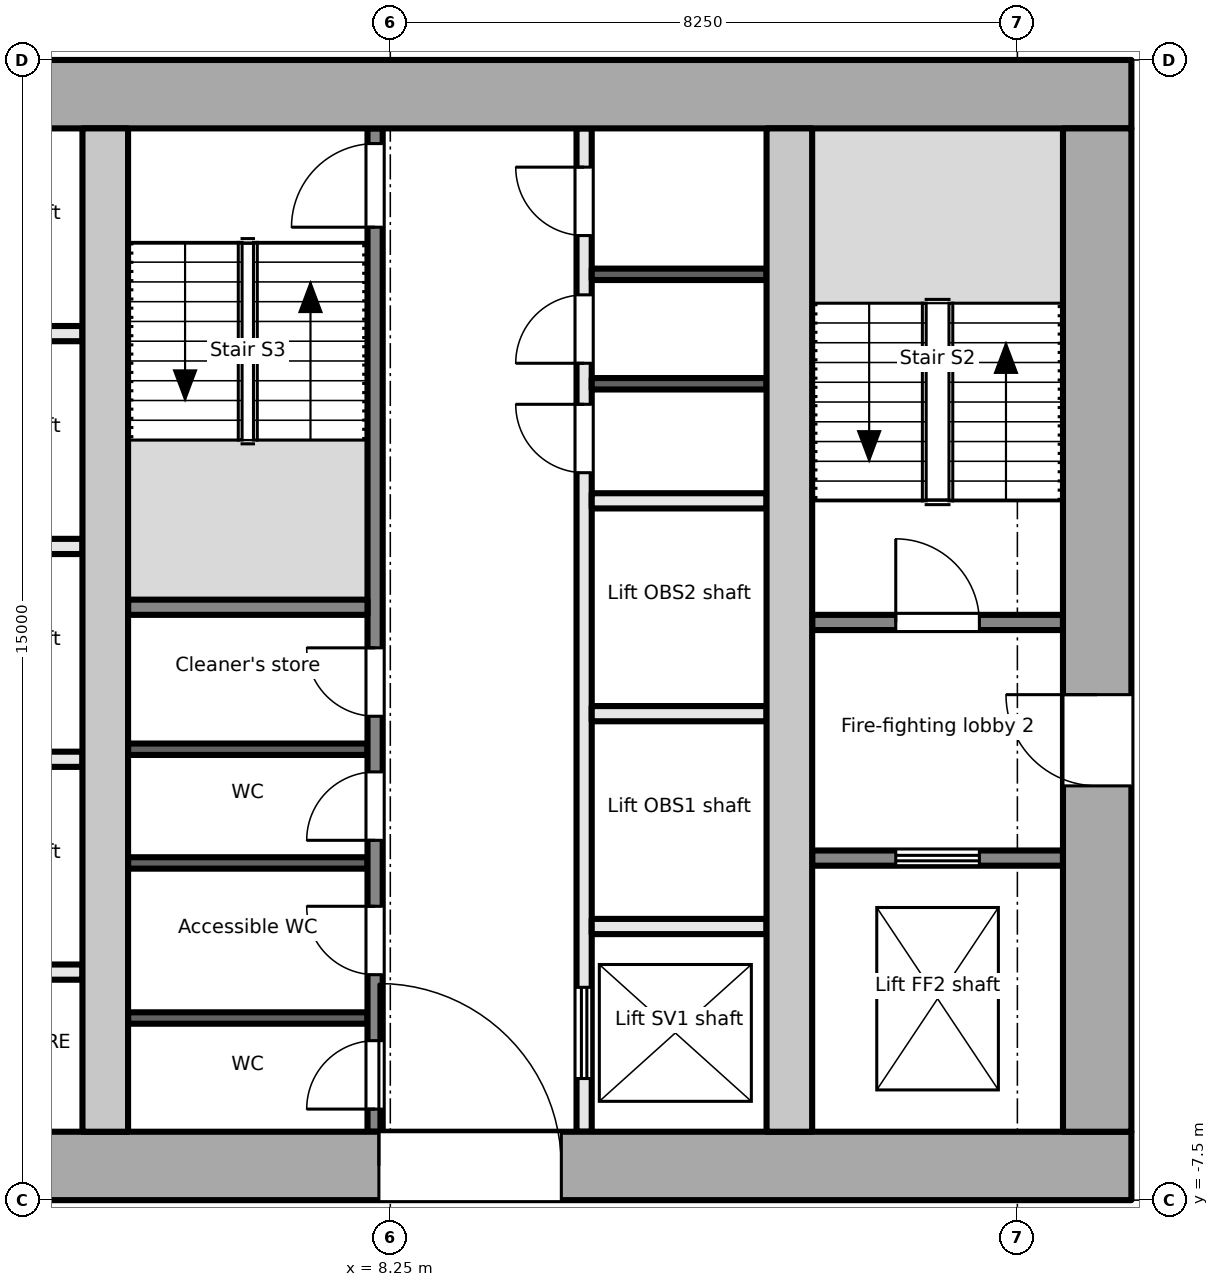
"""IFC4 building model, lengths in metres.
Left out: names, types, materials, properties, quantities, classifications, styles, units other than length and angle.
Written with IfcOpenShell. Run it as: python <this file> out.ifc"""

import sys

from ifc_helpers import new_model, si_unit, direction, frame, frame_2d, origin, place, context, subcontext, project, spatial, rectangle, extrude, element, fill, save


model = new_model("IFC4")
c1 = context("Model", 3, precision=1e-05, world=origin(), true_north=direction((0.0, 1.0)))
c2 = subcontext(c1, "Body", "Model", "MODEL_VIEW")
j1 = project(units=[si_unit("LENGTHUNIT", "METRE"), si_unit("PLANEANGLEUNIT", "RADIAN")], contexts=[c1])
p1 = place(None, origin())
s1 = spatial("IfcSite", under=j1, at=p1, CompositionType="ELEMENT")
p2 = place(p1, origin())
s2 = spatial("IfcBuilding", under=s1, at=p2, CompositionType="ELEMENT")
p3 = place(p2, frame((0.0, 0.0, 99.7)))
s3 = spatial("IfcBuildingStorey", under=s2, at=p3, CompositionType="ELEMENT", Elevation=99.7)
p4 = place(p3, frame((-18.0, -7.05, -0.2), z_axis=(0.0, 0.0, 1.0), x_axis=(1.0, 0.0, 0.0)))
e1 = element("IfcWall", 1, at=p4, inside=s3, PredefinedType="SHEAR", context=c2, shape_type="SweptSolid", body=[
    extrude(rectangle(XDim=36.0, YDim=0.9, at=frame_2d((18.0, 0.0))), origin(), (0.0, 0.0, 1.0), 4.0),
])
p5 = place(p4, frame((7.8, 0.0, 0.2)))
e2 = element("IfcOpeningElement", 2, at=p5, cuts=e1, PredefinedType="OPENING", context=c2, shape_type="SweptSolid", body=[
    extrude(rectangle(XDim=2.4, YDim=2.1, at=frame_2d((1.2, 1.05))), frame((0.0, 0.46, 0.0), z_axis=(0.0, -1.0, 0.0), x_axis=(1.0, 0.0, 0.0)), (0.0, 0.0, 1.0), 0.921),
])
p6 = place(p4, frame((17.4, 0.0, 0.2)))
e3 = element("IfcOpeningElement", 3, at=p6, cuts=e1, PredefinedType="OPENING", context=c2, shape_type="SweptSolid", body=[
    extrude(rectangle(XDim=1.2, YDim=2.1, at=frame_2d((0.6, 1.05))), frame((0.0, 0.46, 0.0), z_axis=(0.0, -1.0, 0.0), x_axis=(1.0, 0.0, 0.0)), (0.0, 0.0, 1.0), 0.921),
])
p7 = place(p4, frame((26.1, 0.0, 0.2)))
e4 = element("IfcOpeningElement", 4, at=p7, cuts=e1, PredefinedType="OPENING", context=c2, shape_type="SweptSolid", body=[
    extrude(rectangle(XDim=2.4, YDim=2.1, at=frame_2d((1.2, 1.05))), frame((0.0, 0.46, 0.0), z_axis=(0.0, -1.0, 0.0), x_axis=(1.0, 0.0, 0.0)), (0.0, 0.0, 1.0), 0.921),
])
p8 = place(p3, frame((-18.0, 7.05, -0.2), z_axis=(0.0, 0.0, 1.0), x_axis=(1.0, 0.0, 0.0)))
e5 = element("IfcWall", 5, at=p8, inside=s3, PredefinedType="SHEAR", context=c2, shape_type="SweptSolid", body=[
    extrude(rectangle(XDim=36.0, YDim=0.9, at=frame_2d((18.0, 0.0))), origin(), (0.0, 0.0, 1.0), 4.0),
])
p9 = place(p3, frame((17.55, -6.6, -0.2), z_axis=(0.0, 0.0, 1.0), x_axis=(0.0, 1.0, 0.0)))
e6 = element("IfcWall", 6, at=p9, inside=s3, PredefinedType="SHEAR", context=c2, shape_type="SweptSolid", body=[
    extrude(rectangle(XDim=13.2, YDim=0.9, at=frame_2d((6.6, 0.0))), origin(), (0.0, 0.0, 1.0), 4.0),
])
p10 = place(p9, frame((4.55, 0.0, 0.2)))
e7 = element("IfcOpeningElement", 7, at=p10, cuts=e6, PredefinedType="OPENING", context=c2, shape_type="SweptSolid", body=[
    extrude(rectangle(XDim=1.2, YDim=2.1, at=frame_2d((0.6, 1.05))), frame((0.0, 0.46, 0.0), z_axis=(0.0, -1.0, 0.0), x_axis=(1.0, 0.0, 0.0)), (0.0, 0.0, 1.0), 0.921),
])
for number, where, z_axis, x_axis in (
    (8, (4.5, -6.6, -0.2), (0.0, 0.0, 1.0), (0.0, 1.0, 0.0)),
    (9, (13.5, -6.6, -0.2), (0.0, 0.0, 1.0), (0.0, 1.0, 0.0)),
):
    element("IfcWall", number, at=place(p3, frame(where, z_axis=z_axis, x_axis=x_axis)), inside=s3, PredefinedType="SHEAR", context=c2, shape_type="SweptSolid", body=[
        extrude(rectangle(XDim=13.2, YDim=0.6, at=frame_2d((6.6, 0.0))), origin(), (0.0, 0.0, 1.0), 4.0),
    ])
p11 = place(p3, frame((13.8, -3.0, 0.0), z_axis=(0.0, 0.0, 1.0), x_axis=(1.0, 0.0, 0.0)))
e10 = element("IfcWall", 10, at=p11, inside=s3, PredefinedType="PARTITIONING", context=c2, shape_type="SweptSolid", body=[
    extrude(rectangle(XDim=3.3, YDim=0.2, at=frame_2d((1.65, 0.0))), origin(), (0.0, 0.0, 1.0), 3.8),
])
p12 = place(p11, frame((1.1, 0.0, 0.0)))
e11 = element("IfcOpeningElement", 11, at=p12, cuts=e10, PredefinedType="OPENING", context=c2, shape_type="SweptSolid", body=[
    extrude(rectangle(XDim=1.1, YDim=2.1, at=frame_2d((0.55, 1.05))), frame((0.0, 0.111, 0.0), z_axis=(0.0, -1.0, 0.0), x_axis=(1.0, 0.0, 0.0)), (0.0, 0.0, 1.0), 0.221),
])
p13 = place(p3, frame((13.8, 0.1, 0.0), z_axis=(0.0, 0.0, 1.0), x_axis=(1.0, 0.0, 0.0)))
e12 = element("IfcWall", 12, at=p13, inside=s3, PredefinedType="PARTITIONING", context=c2, shape_type="SweptSolid", body=[
    extrude(rectangle(XDim=3.3, YDim=0.2, at=frame_2d((1.65, 0.0))), origin(), (0.0, 0.0, 1.0), 3.8),
])
p14 = place(p13, frame((1.1, 0.0, 0.0)))
e13 = element("IfcOpeningElement", 13, at=p14, cuts=e12, PredefinedType="OPENING", context=c2, shape_type="SweptSolid", body=[
    extrude(rectangle(XDim=1.1, YDim=2.1, at=frame_2d((0.55, 1.05))), frame((0.0, 0.111, 0.0), z_axis=(0.0, -1.0, 0.0), x_axis=(1.0, 0.0, 0.0)), (0.0, 0.0, 1.0), 0.221),
])
for number, where, z_axis, x_axis in (
    (14, (1.9, -1.7, 0.0), (0.0, 0.0, 1.0), (1.0, 0.0, 0.0)),
    (15, (1.9, 1.1, 0.0), (0.0, 0.0, 1.0), (1.0, 0.0, 0.0)),
    (16, (1.9, 3.9, 0.0), (0.0, 0.0, 1.0), (1.0, 0.0, 0.0)),
    (17, (1.9, -4.5, 0.0), (0.0, 0.0, 1.0), (1.0, 0.0, 0.0)),
):
    element("IfcWall", number, at=place(p3, frame(where, z_axis=z_axis, x_axis=x_axis)), inside=s3, PredefinedType="PARTITIONING", context=c2, shape_type="SweptSolid", body=[
        extrude(rectangle(XDim=2.3, YDim=0.2, at=frame_2d((1.15, 0.0))), origin(), (0.0, 0.0, 1.0), 3.8),
    ])
p15 = place(p3, frame((8.05, -6.6, 0.0), z_axis=(0.0, 0.0, 1.0), x_axis=(0.0, 1.0, 0.0)))
e18 = element("IfcWall", 18, at=p15, inside=s3, PredefinedType="PARTITIONING", context=c2, shape_type="SweptSolid", body=[
    extrude(rectangle(XDim=13.2, YDim=0.2, at=frame_2d((6.6, 0.0))), origin(), (0.0, 0.0, 1.0), 3.8),
])
p16 = place(p15, frame((0.298, 0.0, 0.0)))
e19 = element("IfcOpeningElement", 19, at=p16, cuts=e18, PredefinedType="OPENING", context=c2, shape_type="SweptSolid", body=[
    extrude(rectangle(XDim=0.9, YDim=2.1, at=frame_2d((0.45, 1.05))), frame((0.0, 0.111, 0.0), z_axis=(0.0, -1.0, 0.0), x_axis=(1.0, 0.0, 0.0)), (0.0, 0.0, 1.0), 0.221),
])
p17 = place(p15, frame((2.066, 0.0, 0.0)))
e20 = element("IfcOpeningElement", 20, at=p17, cuts=e18, PredefinedType="OPENING", context=c2, shape_type="SweptSolid", body=[
    extrude(rectangle(XDim=0.9, YDim=2.1, at=frame_2d((0.45, 1.05))), frame((0.0, 0.111, 0.0), z_axis=(0.0, -1.0, 0.0), x_axis=(1.0, 0.0, 0.0)), (0.0, 0.0, 1.0), 0.221),
])
p18 = place(p15, frame((3.834, 0.0, 0.0)))
e21 = element("IfcOpeningElement", 21, at=p18, cuts=e18, PredefinedType="OPENING", context=c2, shape_type="SweptSolid", body=[
    extrude(rectangle(XDim=0.9, YDim=2.1, at=frame_2d((0.45, 1.05))), frame((0.0, 0.111, 0.0), z_axis=(0.0, -1.0, 0.0), x_axis=(1.0, 0.0, 0.0)), (0.0, 0.0, 1.0), 0.221),
])
p19 = place(p15, frame((5.466, 0.0, 0.0)))
e22 = element("IfcOpeningElement", 22, at=p19, cuts=e18, PredefinedType="OPENING", context=c2, shape_type="SweptSolid", body=[
    extrude(rectangle(XDim=0.9, YDim=2.1, at=frame_2d((0.45, 1.05))), frame((0.0, 0.111, 0.0), z_axis=(0.0, -1.0, 0.0), x_axis=(1.0, 0.0, 0.0)), (0.0, 0.0, 1.0), 0.221),
])
p20 = place(p15, frame((11.9, 0.0, 0.0)))
e23 = element("IfcOpeningElement", 23, at=p20, cuts=e18, PredefinedType="OPENING", context=c2, shape_type="SweptSolid", body=[
    extrude(rectangle(XDim=1.1, YDim=2.1, at=frame_2d((0.55, 1.05))), frame((0.0, 0.111, 0.0), z_axis=(0.0, -1.0, 0.0), x_axis=(1.0, 0.0, 0.0)), (0.0, 0.0, 1.0), 0.221),
])
p21 = place(p3, frame((10.8, -6.6, 0.0), z_axis=(0.0, 0.0, 1.0), x_axis=(0.0, 1.0, 0.0)))
e24 = element("IfcWall", 24, at=p21, inside=s3, PredefinedType="PARTITIONING", context=c2, shape_type="SweptSolid", body=[
    extrude(rectangle(XDim=13.2, YDim=0.2, at=frame_2d((6.6, 0.0))), origin(), (0.0, 0.0, 1.0), 3.8),
])
p22 = place(p21, frame((0.7, 0.0, 0.0)))
e25 = element("IfcOpeningElement", 25, at=p22, cuts=e24, PredefinedType="OPENING", context=c2, shape_type="SweptSolid", body=[
    extrude(rectangle(XDim=1.2, YDim=2.1, at=frame_2d((0.6, 1.05))), frame((0.0, 0.111, 0.0), z_axis=(0.0, -1.0, 0.0), x_axis=(1.0, 0.0, 0.0)), (0.0, 0.0, 1.0), 0.221),
])
p23 = place(p21, frame((8.67, 0.0, 0.0)))
e26 = element("IfcOpeningElement", 26, at=p23, cuts=e24, PredefinedType="OPENING", context=c2, shape_type="SweptSolid", body=[
    extrude(rectangle(XDim=0.9, YDim=2.1, at=frame_2d((0.45, 1.05))), frame((0.0, 0.111, 0.0), z_axis=(0.0, -1.0, 0.0), x_axis=(1.0, 0.0, 0.0)), (0.0, 0.0, 1.0), 0.221),
])
p24 = place(p21, frame((10.11, 0.0, 0.0)))
e27 = element("IfcOpeningElement", 27, at=p24, cuts=e24, PredefinedType="OPENING", context=c2, shape_type="SweptSolid", body=[
    extrude(rectangle(XDim=0.9, YDim=2.1, at=frame_2d((0.45, 1.05))), frame((0.0, 0.111, 0.0), z_axis=(0.0, -1.0, 0.0), x_axis=(1.0, 0.0, 0.0)), (0.0, 0.0, 1.0), 0.221),
])
p25 = place(p21, frame((11.79, 0.0, 0.0)))
e28 = element("IfcOpeningElement", 28, at=p25, cuts=e24, PredefinedType="OPENING", context=c2, shape_type="SweptSolid", body=[
    extrude(rectangle(XDim=0.9, YDim=2.1, at=frame_2d((0.45, 1.05))), frame((0.0, 0.111, 0.0), z_axis=(0.0, -1.0, 0.0), x_axis=(1.0, 0.0, 0.0)), (0.0, 0.0, 1.0), 0.221),
])
p26 = place(p3, frame((4.8, 0.3, 0.0), z_axis=(0.0, 0.0, 1.0), x_axis=(1.0, 0.0, 0.0)))
e29 = element("IfcWall", 29, at=p26, inside=s3, PredefinedType="PARTITIONING", context=c2, shape_type="SweptSolid", body=[
    extrude(rectangle(XDim=3.15, YDim=0.2, at=frame_2d((1.575, 0.0))), origin(), (0.0, 0.0, 1.0), 3.8),
])
for number, where, z_axis, x_axis in (
    (30, (4.8, -5.104, 0.0), (0.0, 0.0, 1.0), (1.0, 0.0, 0.0)),
    (31, (4.8, -3.064, 0.0), (0.0, 0.0, 1.0), (1.0, 0.0, 0.0)),
    (32, (4.8, -1.568, 0.0), (0.0, 0.0, 1.0), (1.0, 0.0, 0.0)),
):
    element("IfcWall", number, at=place(p3, frame(where, z_axis=z_axis, x_axis=x_axis)), inside=s3, PredefinedType="PARTITIONING", context=c2, shape_type="SweptSolid", body=[
        extrude(rectangle(XDim=3.15, YDim=0.15, at=frame_2d((1.575, 0.0))), origin(), (0.0, 0.0, 1.0), 3.8),
    ])
for number, where, z_axis, x_axis in (
    (33, (10.9, -3.9, 0.0), (0.0, 0.0, 1.0), (1.0, 0.0, 0.0)),
    (34, (10.9, -1.1, 0.0), (0.0, 0.0, 1.0), (1.0, 0.0, 0.0)),
    (35, (10.9, 1.7, 0.0), (0.0, 0.0, 1.0), (1.0, 0.0, 0.0)),
):
    element("IfcWall", number, at=place(p3, frame(where, z_axis=z_axis, x_axis=x_axis)), inside=s3, PredefinedType="PARTITIONING", context=c2, shape_type="SweptSolid", body=[
        extrude(rectangle(XDim=2.3, YDim=0.2, at=frame_2d((1.15, 0.0))), origin(), (0.0, 0.0, 1.0), 3.8),
    ])
for number, where, z_axis, x_axis in (
    (36, (10.9, 3.24, 0.0), (0.0, 0.0, 1.0), (1.0, 0.0, 0.0)),
    (37, (10.9, 4.68, 0.0), (0.0, 0.0, 1.0), (1.0, 0.0, 0.0)),
):
    element("IfcWall", number, at=place(p3, frame(where, z_axis=z_axis, x_axis=x_axis)), inside=s3, PredefinedType="PARTITIONING", context=c2, shape_type="SweptSolid", body=[
        extrude(rectangle(XDim=2.3, YDim=0.15, at=frame_2d((1.15, 0.0))), origin(), (0.0, 0.0, 1.0), 3.8),
    ])
p27 = place(p12, origin())
e38 = element("IfcDoor", 38, at=p27, inside=s3, OperationType="DOUBLE_DOOR_SLIDING", PredefinedType="DOOR", context=c2, shape_type="SweptSolid", body=[
    extrude(rectangle(XDim=1.1, YDim=2.1, at=frame_2d((0.55, 1.05))), frame((0.0, 0.025, 0.0), z_axis=(0.0, -1.0, 0.0), x_axis=(1.0, 0.0, 0.0)), (0.0, 0.0, 1.0), 0.05),
])
fill(e11, e38)
p28 = place(p10, origin())
e39 = element("IfcDoor", 39, at=p28, inside=s3, OperationType="SINGLE_SWING_RIGHT", PredefinedType="DOOR", context=c2, shape_type="SweptSolid", body=[
    extrude(rectangle(XDim=1.2, YDim=2.1, at=frame_2d((0.6, 1.05))), frame((0.0, 0.025, 0.0), z_axis=(0.0, -1.0, 0.0), x_axis=(1.0, 0.0, 0.0)), (0.0, 0.0, 1.0), 0.05),
])
fill(e7, e39)
p29 = place(p14, origin())
e40 = element("IfcDoor", 40, at=p29, inside=s3, OperationType="SINGLE_SWING_LEFT", PredefinedType="DOOR", context=c2, shape_type="SweptSolid", body=[
    extrude(rectangle(XDim=1.1, YDim=2.1, at=frame_2d((0.55, 1.05))), frame((0.0, 0.025, 0.0), z_axis=(0.0, -1.0, 0.0), x_axis=(1.0, 0.0, 0.0)), (0.0, 0.0, 1.0), 0.05),
])
fill(e13, e40)
p30 = place(p16, origin())
e41 = element("IfcDoor", 41, at=p30, inside=s3, OperationType="SINGLE_SWING_LEFT", PredefinedType="DOOR", context=c2, shape_type="SweptSolid", body=[
    extrude(rectangle(XDim=0.9, YDim=2.1, at=frame_2d((0.45, 1.05))), frame((0.0, 0.025, 0.0), z_axis=(0.0, -1.0, 0.0), x_axis=(1.0, 0.0, 0.0)), (0.0, 0.0, 1.0), 0.05),
])
fill(e19, e41)
p31 = place(p17, origin())
e42 = element("IfcDoor", 42, at=p31, inside=s3, OperationType="SINGLE_SWING_RIGHT", PredefinedType="DOOR", context=c2, shape_type="SweptSolid", body=[
    extrude(rectangle(XDim=0.9, YDim=2.1, at=frame_2d((0.45, 1.05))), frame((0.0, 0.025, 0.0), z_axis=(0.0, -1.0, 0.0), x_axis=(1.0, 0.0, 0.0)), (0.0, 0.0, 1.0), 0.05),
])
fill(e20, e42)
p32 = place(p18, origin())
e43 = element("IfcDoor", 43, at=p32, inside=s3, OperationType="SINGLE_SWING_LEFT", PredefinedType="DOOR", context=c2, shape_type="SweptSolid", body=[
    extrude(rectangle(XDim=0.9, YDim=2.1, at=frame_2d((0.45, 1.05))), frame((0.0, 0.025, 0.0), z_axis=(0.0, -1.0, 0.0), x_axis=(1.0, 0.0, 0.0)), (0.0, 0.0, 1.0), 0.05),
])
fill(e21, e43)
p33 = place(p19, origin())
e44 = element("IfcDoor", 44, at=p33, inside=s3, OperationType="SINGLE_SWING_RIGHT", PredefinedType="DOOR", context=c2, shape_type="SweptSolid", body=[
    extrude(rectangle(XDim=0.9, YDim=2.1, at=frame_2d((0.45, 1.05))), frame((0.0, 0.025, 0.0), z_axis=(0.0, -1.0, 0.0), x_axis=(1.0, 0.0, 0.0)), (0.0, 0.0, 1.0), 0.05),
])
fill(e22, e44)
p34 = place(p20, origin())
e45 = element("IfcDoor", 45, at=p34, inside=s3, OperationType="SINGLE_SWING_LEFT", PredefinedType="DOOR", context=c2, shape_type="SweptSolid", body=[
    extrude(rectangle(XDim=1.1, YDim=2.1, at=frame_2d((0.55, 1.05))), frame((0.0, 0.025, 0.0), z_axis=(0.0, -1.0, 0.0), x_axis=(1.0, 0.0, 0.0)), (0.0, 0.0, 1.0), 0.05),
])
fill(e23, e45)
p35 = place(p7, origin())
e46 = element("IfcDoor", 46, at=p35, inside=s3, OperationType="DOUBLE_DOOR_DOUBLE_SWING", PredefinedType="DOOR", context=c2, shape_type="SweptSolid", body=[
    extrude(rectangle(XDim=2.4, YDim=2.1, at=frame_2d((1.2, 1.05))), frame((0.0, 0.025, 0.0), z_axis=(0.0, -1.0, 0.0), x_axis=(1.0, 0.0, 0.0)), (0.0, 0.0, 1.0), 0.05),
])
fill(e4, e46)
p36 = place(p22, origin())
e47 = element("IfcDoor", 47, at=p36, inside=s3, OperationType="DOUBLE_DOOR_SLIDING", PredefinedType="DOOR", context=c2, shape_type="SweptSolid", body=[
    extrude(rectangle(XDim=1.2, YDim=2.1, at=frame_2d((0.6, 1.05))), frame((0.0, 0.025, 0.0), z_axis=(0.0, -1.0, 0.0), x_axis=(1.0, 0.0, 0.0)), (0.0, 0.0, 1.0), 0.05),
])
fill(e25, e47)
p37 = place(p23, origin())
e48 = element("IfcDoor", 48, at=p37, inside=s3, OperationType="SINGLE_SWING_RIGHT", PredefinedType="DOOR", context=c2, shape_type="SweptSolid", body=[
    extrude(rectangle(XDim=0.9, YDim=2.1, at=frame_2d((0.45, 1.05))), frame((0.0, 0.025, 0.0), z_axis=(0.0, -1.0, 0.0), x_axis=(1.0, 0.0, 0.0)), (0.0, 0.0, 1.0), 0.05),
])
fill(e26, e48)
p38 = place(p24, origin())
e49 = element("IfcDoor", 49, at=p38, inside=s3, OperationType="SINGLE_SWING_LEFT", PredefinedType="DOOR", context=c2, shape_type="SweptSolid", body=[
    extrude(rectangle(XDim=0.9, YDim=2.1, at=frame_2d((0.45, 1.05))), frame((0.0, 0.025, 0.0), z_axis=(0.0, -1.0, 0.0), x_axis=(1.0, 0.0, 0.0)), (0.0, 0.0, 1.0), 0.05),
])
fill(e27, e49)
p39 = place(p25, origin())
e50 = element("IfcDoor", 50, at=p39, inside=s3, OperationType="SINGLE_SWING_RIGHT", PredefinedType="DOOR", context=c2, shape_type="SweptSolid", body=[
    extrude(rectangle(XDim=0.9, YDim=2.1, at=frame_2d((0.45, 1.05))), frame((0.0, 0.025, 0.0), z_axis=(0.0, -1.0, 0.0), x_axis=(1.0, 0.0, 0.0)), (0.0, 0.0, 1.0), 0.05),
])
fill(e28, e50)
save(model, sys.argv[1])
